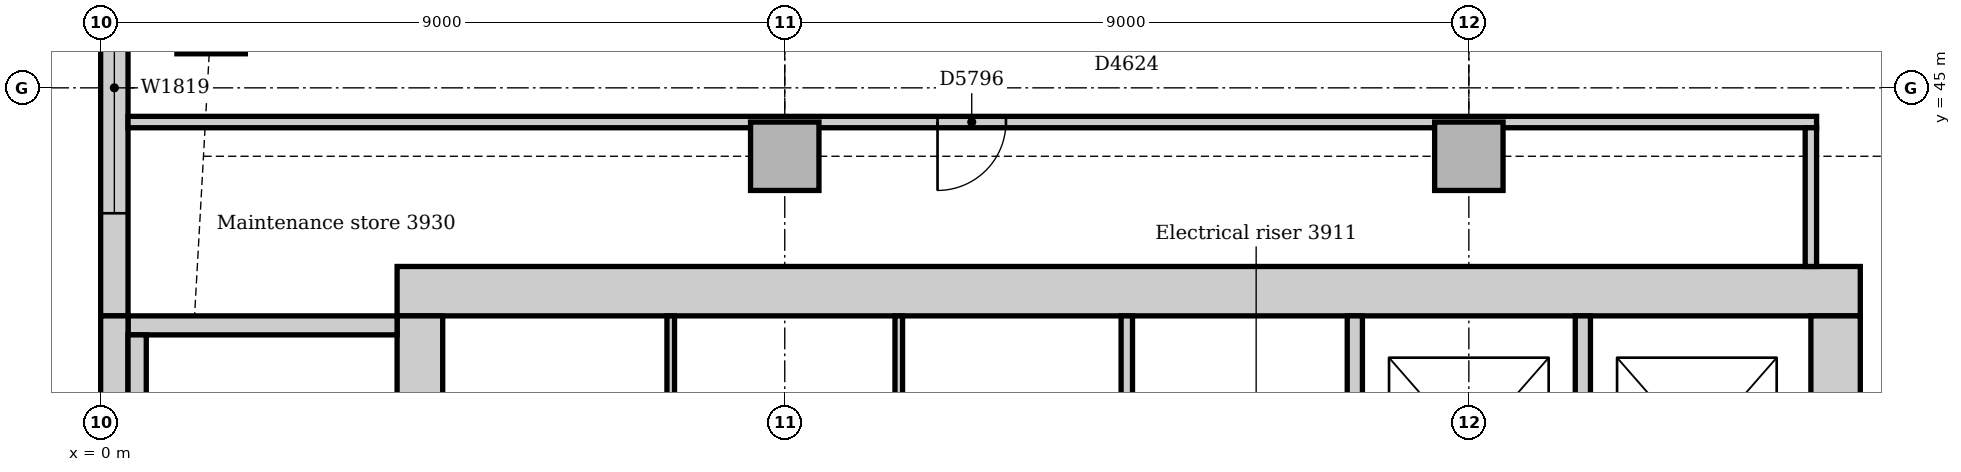
"""IFC4 building model, lengths in metres.
Left out: names, types, materials, properties, quantities, classifications, styles, units other than length and angle.
Written with IfcOpenShell. Run it as: python <this file> out.ifc"""

import sys

from ifc_helpers import new_model, si_unit, direction, frame, frame_2d, origin, origin_2d, place, context, subcontext, project, spatial, rectangle, extrude, element, fill, save


model = new_model("IFC4")
c1 = context("Model", 3, precision=1e-05, world=origin(), true_north=direction((0.0, 1.0)))
c2 = subcontext(c1, "Body", "Model", "MODEL_VIEW")
j1 = project(units=[si_unit("LENGTHUNIT", "METRE"), si_unit("PLANEANGLEUNIT", "RADIAN")], contexts=[c1])
p1 = place(None, origin())
s1 = spatial("IfcSite", under=j1, at=p1, CompositionType="ELEMENT")
p2 = place(p1, origin())
s2 = spatial("IfcBuilding", under=s1, at=p2, CompositionType="ELEMENT")
p3 = place(p2, frame((0.0, 0.0, 165.0)))
s3 = spatial("IfcBuildingStorey", under=s2, at=p3, CompositionType="ELEMENT", Elevation=165.0)
p4 = place(p3, frame((23.15, 42.325, 0.0), z_axis=(0.0, 0.0, 1.0), x_axis=(-1.0, 0.0, 0.0)))
e1 = element("IfcWall", 1, at=p4, inside=s3, PredefinedType="SOLIDWALL", context=c2, shape_type="SweptSolid", body=[
    extrude(rectangle(XDim=19.25, YDim=0.65, at=frame_2d((9.625, 0.0))), origin(), (0.0, 0.0, 1.0), 4.0),
])
p5 = place(p3, frame((22.825, 31.5, 0.0), z_axis=(0.0, 0.0, 1.0), x_axis=(0.0, 1.0, 0.0)))
e2 = element("IfcWall", 2, at=p5, inside=s3, PredefinedType="SOLIDWALL", context=c2, shape_type="SweptSolid", body=[
    extrude(rectangle(XDim=10.5, YDim=0.65, at=frame_2d((5.25, 0.0))), origin(), (0.0, 0.0, 1.0), 4.0),
])
p6 = place(p5, frame((3.15, 0.0, 0.0)))
e3 = element("IfcOpeningElement", 3, at=p6, cuts=e2, PredefinedType="OPENING", context=c2, shape_type="SweptSolid", body=[
    extrude(rectangle(XDim=1.0, YDim=2.1, at=frame_2d((0.5, 1.05))), frame((0.0, 0.335, 0.0), z_axis=(0.0, -1.0, 0.0), x_axis=(1.0, 0.0, 0.0)), (0.0, 0.0, 1.0), 0.67),
])
p7 = place(p5, frame((5.2, 0.0, 0.0)))
e4 = element("IfcOpeningElement", 4, at=p7, cuts=e2, PredefinedType="OPENING", context=c2, shape_type="SweptSolid", body=[
    extrude(rectangle(XDim=1.0, YDim=2.1, at=frame_2d((0.5, 1.05))), frame((0.0, 0.335, 0.0), z_axis=(0.0, -1.0, 0.0), x_axis=(1.0, 0.0, 0.0)), (0.0, 0.0, 1.0), 0.67),
])
p8 = place(p3, frame((4.2, 42.0, 0.0), z_axis=(0.0, 0.0, 1.0), x_axis=(0.0, -1.0, 0.0)))
e5 = element("IfcWall", 5, at=p8, inside=s3, PredefinedType="SOLIDWALL", context=c2, shape_type="SweptSolid", body=[
    extrude(rectangle(XDim=10.5, YDim=0.6, at=frame_2d((5.25, 0.0))), origin(), (0.0, 0.0, 1.0), 4.0),
])
p9 = place(p8, frame((5.3, 0.0, 0.0)))
e6 = element("IfcOpeningElement", 6, at=p9, cuts=e5, PredefinedType="OPENING", context=c2, shape_type="SweptSolid", body=[
    extrude(rectangle(XDim=1.0, YDim=2.1, at=frame_2d((0.5, 1.05))), frame((0.0, 0.31, 0.0), z_axis=(0.0, -1.0, 0.0), x_axis=(1.0, 0.0, 0.0)), (0.0, 0.0, 1.0), 0.62),
])
p10 = place(p3, frame((3.9, 41.875, 0.0), z_axis=(0.0, 0.0, 1.0), x_axis=(-1.0, 0.0, 0.0)))
e7 = element("IfcWall", 7, at=p10, inside=s3, PredefinedType="SOLIDWALL", context=c2, shape_type="SweptSolid", body=[
    extrude(rectangle(XDim=3.54, YDim=0.25, at=frame_2d((1.77, 0.0))), origin(), (0.0, 0.0, 1.0), 4.0),
])
for number, where, z_axis, x_axis in (
    (8, (1.453, 45.898, 0.0), (0.0, 0.0, 1.0), (1.0, 0.0, 0.0)),
    (9, (9.0, 44.1, 0.0), (0.0, 0.0, 1.0), (1.0, 0.0, 0.0)),
    (10, (18.0, 44.1, 0.0), (0.0, 0.0, 1.0), (1.0, 0.0, 0.0)),
):
    element("IfcColumn", number, at=place(p3, frame(where, z_axis=z_axis, x_axis=x_axis)), inside=s3, PredefinedType="COLUMN", context=c2, shape_type="SweptSolid", body=[
        extrude(rectangle(XDim=0.9, YDim=0.9, at=origin_2d()), origin(), (0.0, 0.0, 1.0), 3.85),
    ])
p11 = place(p3, frame((0.18, 49.757, 0.0), z_axis=(0.0, 0.0, 1.0), x_axis=(0.0, -1.0, 0.0)))
e11 = element("IfcWall", 11, at=p11, inside=s3, PredefinedType="STANDARD", context=c2, shape_type="SweptSolid", body=[
    extrude(rectangle(XDim=7.757, YDim=0.36, at=frame_2d((3.879, 0.0))), origin(), (0.0, 0.0, 1.0), 3.85),
])
p12 = place(p11, frame((3.107, 0.0, 0.9)))
e12 = element("IfcOpeningElement", 12, at=p12, cuts=e11, PredefinedType="OPENING", context=c2, shape_type="SweptSolid", body=[
    extrude(rectangle(XDim=3.3, YDim=1.6, at=frame_2d((1.65, 0.8))), frame((0.0, 0.19, 0.0), z_axis=(0.0, -1.0, 0.0), x_axis=(1.0, 0.0, 0.0)), (0.0, 0.0, 1.0), 0.38),
])
p13 = place(p3, frame((0.18, 42.0, 0.0), z_axis=(0.0, 0.0, 1.0), x_axis=(0.0, -1.0, 0.0)))
e13 = element("IfcWall", 13, at=p13, inside=s3, PredefinedType="STANDARD", context=c2, shape_type="SweptSolid", body=[
    extrude(rectangle(XDim=6.75, YDim=0.36, at=frame_2d((3.375, 0.0))), origin(), (0.0, 0.0, 1.0), 3.85),
])
p14 = place(p3, frame((0.48, 40.13, 0.0), z_axis=(0.0, 0.0, 1.0), x_axis=(0.0, 1.0, 0.0)))
e14 = element("IfcWall", 14, at=p14, inside=s3, PredefinedType="STANDARD", context=c2, shape_type="SweptSolid", body=[
    extrude(rectangle(XDim=1.62, YDim=0.24, at=frame_2d((0.81, 0.0))), origin(), (0.0, 0.0, 1.0), 4.0),
])
for number, where, z_axis, x_axis in (
    (15, (16.5, 38.6, 0.0), (0.0, 0.0, 1.0), (0.0, 1.0, 0.0)),
    (16, (19.5, 38.6, 0.0), (0.0, 0.0, 1.0), (0.0, 1.0, 0.0)),
):
    element("IfcWall", number, at=place(p3, frame(where, z_axis=z_axis, x_axis=x_axis)), inside=s3, PredefinedType="PARTITIONING", context=c2, shape_type="SweptSolid", body=[
        extrude(rectangle(XDim=3.4, YDim=0.2, at=frame_2d((1.7, 0.0))), origin(), (0.0, 0.0, 1.0), 3.85),
    ])
p15 = place(p3, frame((0.36, 44.55, 0.0), z_axis=(0.0, 0.0, 1.0), x_axis=(1.0, 0.0, 0.0)))
e17 = element("IfcWall", 17, at=p15, inside=s3, PredefinedType="PARTITIONING", context=c2, shape_type="SweptSolid", body=[
    extrude(rectangle(XDim=22.215, YDim=0.15, at=frame_2d((11.107, 0.0))), origin(), (0.0, 0.0, 1.0), 3.85),
])
p16 = place(p15, frame((10.65, 0.0, 0.0)))
e18 = element("IfcOpeningElement", 18, at=p16, cuts=e17, PredefinedType="OPENING", context=c2, shape_type="SweptSolid", body=[
    extrude(rectangle(XDim=0.9, YDim=2.1, at=frame_2d((0.45, 1.05))), frame((0.0, 0.085, 0.0), z_axis=(0.0, -1.0, 0.0), x_axis=(1.0, 0.0, 0.0)), (0.0, 0.0, 1.0), 0.17),
])
p17 = place(p3, frame((22.5, 42.65, 0.0), z_axis=(0.0, 0.0, 1.0), x_axis=(0.0, 1.0, 0.0)))
e19 = element("IfcWall", 19, at=p17, inside=s3, PredefinedType="PARTITIONING", context=c2, shape_type="SweptSolid", body=[
    extrude(rectangle(XDim=1.825, YDim=0.15, at=frame_2d((0.912, 0.0))), origin(), (0.0, 0.0, 1.0), 3.85),
])
p18 = place(p3, frame((13.5, 38.575, 0.0), z_axis=(0.0, 0.0, 1.0), x_axis=(0.0, 1.0, 0.0)))
e20 = element("IfcWall", 20, at=p18, inside=s3, PredefinedType="PARTITIONING", context=c2, shape_type="SweptSolid", body=[
    extrude(rectangle(XDim=3.425, YDim=0.15, at=frame_2d((1.712, 0.0))), origin(), (0.0, 0.0, 1.0), 3.85),
])
for number, where, z_axis, x_axis in (
    (21, (7.5, 38.575, 0.0), (0.0, 0.0, 1.0), (0.0, 1.0, 0.0)),
    (22, (10.5, 38.575, 0.0), (0.0, 0.0, 1.0), (0.0, 1.0, 0.0)),
):
    element("IfcWall", number, at=place(p3, frame(where, z_axis=z_axis, x_axis=x_axis)), inside=s3, PredefinedType="PARTITIONING", context=c2, shape_type="SweptSolid", body=[
        extrude(rectangle(XDim=3.425, YDim=0.1, at=frame_2d((1.712, 0.0))), origin(), (0.0, 0.0, 1.0), 3.85),
    ])
p19 = place(p12, origin())
e23 = element("IfcWindow", 23, at=p19, inside=s3, PartitioningType="SINGLE_PANEL", PredefinedType="WINDOW", context=c2, shape_type="SweptSolid", body=[
    extrude(rectangle(XDim=3.3, YDim=1.6, at=frame_2d((1.65, 0.8))), frame((0.0, 0.13, 0.0), z_axis=(0.0, -1.0, 0.0), x_axis=(1.0, 0.0, 0.0)), (0.0, 0.0, 1.0), 0.06),
])
fill(e12, e23)
p20 = place(p16, frame((0.9, 0.0, 0.0), z_axis=(0.0, 0.0, 1.0), x_axis=(-1.0, 0.0, 0.0)))
e24 = element("IfcDoor", 24, at=p20, inside=s3, OperationType="SINGLE_SWING_RIGHT", PredefinedType="DOOR", context=c2, shape_type="SweptSolid", body=[
    extrude(rectangle(XDim=0.9, YDim=2.1, at=frame_2d((0.45, 1.05))), frame((0.0, 0.025, 0.0), z_axis=(0.0, -1.0, 0.0), x_axis=(1.0, 0.0, 0.0)), (0.0, 0.0, 1.0), 0.05),
])
fill(e18, e24)
save(model, sys.argv[1])
